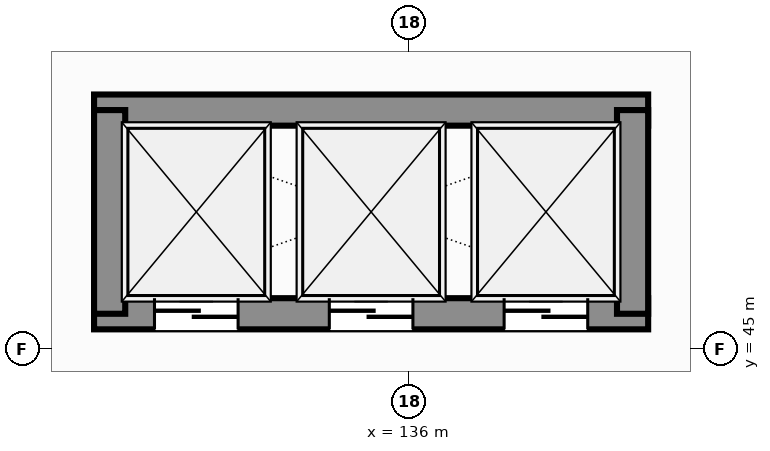
"""IFC4 building model, lengths in metres.
Left out: names, types, materials, properties, quantities, classifications, styles, units other than length and angle.
Written with IfcOpenShell. Run it as: python <this file> out.ifc"""

import sys

from ifc_helpers import new_model, si_unit, direction, frame, frame_2d, origin, place, context, subcontext, project, spatial, rectangle, extrude, element, fill, save


model = new_model("IFC4")
c1 = context("Model", 3, precision=1e-05, world=origin(), true_north=direction((0.0, 1.0)))
c2 = subcontext(c1, "Body", "Model", "MODEL_VIEW")
j1 = project(units=[si_unit("LENGTHUNIT", "METRE"), si_unit("PLANEANGLEUNIT", "RADIAN")], contexts=[c1])
p1 = place(None, origin())
s1 = spatial("IfcSite", under=j1, at=p1, CompositionType="ELEMENT")
p2 = place(p1, origin())
s2 = spatial("IfcBuilding", under=s1, at=p2, CompositionType="ELEMENT")
p3 = place(p2, frame((0.0, 0.0, 6.0)))
s3 = spatial("IfcBuildingStorey", under=s2, at=p3, CompositionType="ELEMENT", Elevation=6.0)
p4 = place(p3, frame((131.855, 45.46, 0.0), z_axis=(0.0, 0.0, 1.0), x_axis=(1.0, 0.0, 0.0)))
e1 = element("IfcWall", 1, at=p4, inside=s3, PredefinedType="SHEAR", context=c2, shape_type="SweptSolid", body=[
    extrude(rectangle(XDim=7.29, YDim=0.41, at=frame_2d((3.645, 0.0))), origin(), (0.0, 0.0, 1.0), 5.4),
])
p5 = place(p4, frame((0.795, 0.0, 0.0)))
e2 = element("IfcOpeningElement", 2, at=p5, cuts=e1, PredefinedType="OPENING", context=c2, shape_type="SweptSolid", body=[
    extrude(rectangle(XDim=1.1, YDim=2.2, at=frame_2d((0.55, 1.1))), frame((0.0, 0.215, 0.0), z_axis=(0.0, -1.0, 0.0), x_axis=(1.0, 0.0, 0.0)), (0.0, 0.0, 1.0), 0.43),
])
p6 = place(p4, frame((3.095, 0.0, 0.0)))
e3 = element("IfcOpeningElement", 3, at=p6, cuts=e1, PredefinedType="OPENING", context=c2, shape_type="SweptSolid", body=[
    extrude(rectangle(XDim=1.1, YDim=2.2, at=frame_2d((0.55, 1.1))), frame((0.0, 0.215, 0.0), z_axis=(0.0, -1.0, 0.0), x_axis=(1.0, 0.0, 0.0)), (0.0, 0.0, 1.0), 0.43),
])
p7 = place(p4, frame((5.395, 0.0, 0.0)))
e4 = element("IfcOpeningElement", 4, at=p7, cuts=e1, PredefinedType="OPENING", context=c2, shape_type="SweptSolid", body=[
    extrude(rectangle(XDim=1.1, YDim=2.2, at=frame_2d((0.55, 1.1))), frame((0.0, 0.215, 0.0), z_axis=(0.0, -1.0, 0.0), x_axis=(1.0, 0.0, 0.0)), (0.0, 0.0, 1.0), 0.43),
])
p8 = place(p3, frame((131.855, 48.14, 0.0), z_axis=(0.0, 0.0, 1.0), x_axis=(1.0, 0.0, 0.0)))
e5 = element("IfcWall", 5, at=p8, inside=s3, PredefinedType="SHEAR", context=c2, shape_type="SweptSolid", body=[
    extrude(rectangle(XDim=7.29, YDim=0.41, at=frame_2d((3.645, 0.0))), origin(), (0.0, 0.0, 1.0), 5.4),
])
for number, where, z_axis, x_axis in (
    (6, (132.06, 45.46, 0.0), (0.0, 0.0, 1.0), (0.0, 1.0, 0.0)),
    (7, (138.94, 45.46, 0.0), (0.0, 0.0, 1.0), (0.0, 1.0, 0.0)),
):
    element("IfcWall", number, at=place(p3, frame(where, z_axis=z_axis, x_axis=x_axis)), inside=s3, PredefinedType="SHEAR", context=c2, shape_type="SweptSolid", body=[
        extrude(rectangle(XDim=2.68, YDim=0.41, at=frame_2d((1.34, 0.0))), origin(), (0.0, 0.0, 1.0), 5.4),
    ])
p9 = place(p5, origin())
e8 = element("IfcDoor", 8, at=p9, inside=s3, OperationType="DOUBLE_DOOR_SLIDING", PredefinedType="DOOR", context=c2, shape_type="SweptSolid", body=[
    extrude(rectangle(XDim=1.1, YDim=2.2, at=frame_2d((0.55, 1.1))), frame((0.0, 0.025, 0.0), z_axis=(0.0, -1.0, 0.0), x_axis=(1.0, 0.0, 0.0)), (0.0, 0.0, 1.0), 0.05),
])
fill(e2, e8)
p10 = place(p6, origin())
e9 = element("IfcDoor", 9, at=p10, inside=s3, OperationType="DOUBLE_DOOR_SLIDING", PredefinedType="DOOR", context=c2, shape_type="SweptSolid", body=[
    extrude(rectangle(XDim=1.1, YDim=2.2, at=frame_2d((0.55, 1.1))), frame((0.0, 0.025, 0.0), z_axis=(0.0, -1.0, 0.0), x_axis=(1.0, 0.0, 0.0)), (0.0, 0.0, 1.0), 0.05),
])
fill(e3, e9)
p11 = place(p7, origin())
e10 = element("IfcDoor", 10, at=p11, inside=s3, OperationType="DOUBLE_DOOR_SLIDING", PredefinedType="DOOR", context=c2, shape_type="SweptSolid", body=[
    extrude(rectangle(XDim=1.1, YDim=2.2, at=frame_2d((0.55, 1.1))), frame((0.0, 0.025, 0.0), z_axis=(0.0, -1.0, 0.0), x_axis=(1.0, 0.0, 0.0)), (0.0, 0.0, 1.0), 0.05),
])
fill(e4, e10)
save(model, sys.argv[1])
